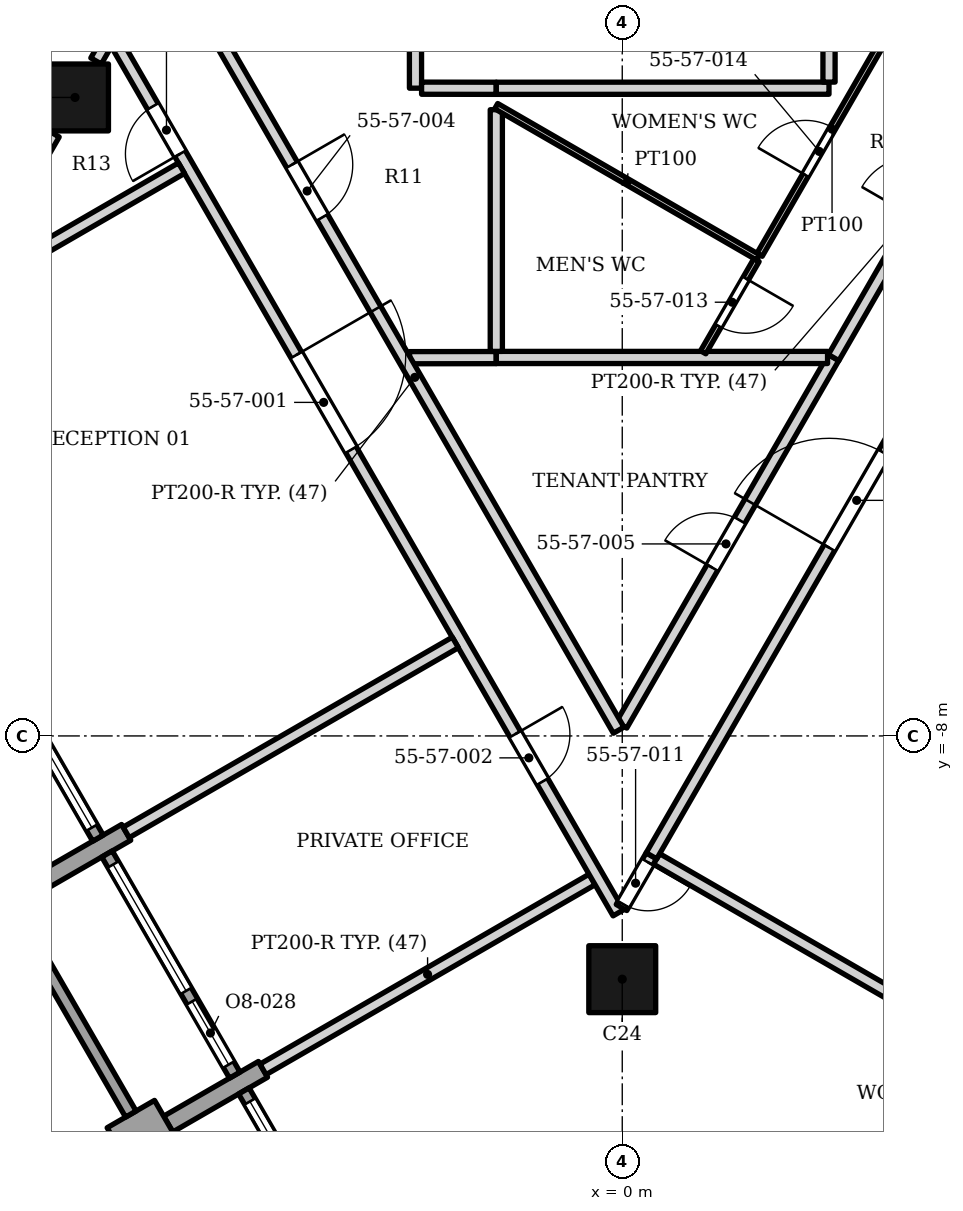
"""IFC4 building model, lengths in metres.
Left out: names, types, materials, properties, quantities, classifications, styles, units other than length and angle.
Written with IfcOpenShell. Run it as: python <this file> out.ifc"""

import sys

from ifc_helpers import new_model, si_unit, direction, frame, frame_2d, origin, origin_2d, place, context, subcontext, project, spatial, rectangle, extrude, element, fill, save


model = new_model("IFC4")
c1 = context("Model", 3, precision=1e-05, world=origin(), true_north=direction((0.0, 1.0)))
c2 = subcontext(c1, "Body", "Model", "MODEL_VIEW")
j1 = project(units=[si_unit("LENGTHUNIT", "METRE"), si_unit("PLANEANGLEUNIT", "RADIAN")], contexts=[c1])
p1 = place(None, origin())
s1 = spatial("IfcSite", under=j1, at=p1, CompositionType="ELEMENT")
p2 = place(p1, origin())
s2 = spatial("IfcBuilding", under=s1, at=p2, CompositionType="ELEMENT")
p3 = place(p2, frame((0.0, 0.0, 231.5)))
s3 = spatial("IfcBuildingStorey", under=s2, at=p3, CompositionType="ELEMENT", Elevation=231.5)
for number, where, z_axis, x_axis in (
    (1, (-9.0, 2.5, 0.0), (0.0, 0.0, 1.0), (1.0, 0.0, 0.0)),
    (2, (0.0, -12.0, 0.0), (0.0, 0.0, 1.0), (1.0, 0.0, 0.0)),
):
    element("IfcColumn", number, at=place(p3, frame(where, z_axis=z_axis, x_axis=x_axis)), inside=s3, PredefinedType="COLUMN", context=c2, shape_type="SweptSolid", body=[
        extrude(rectangle(XDim=1.1, YDim=1.1, at=origin_2d()), origin(), (0.0, 0.0, 1.0), 3.9),
    ])
p4 = place(p3, frame((-9.717, -10.486, 0.0), z_axis=(0.0, 0.0, 1.0), x_axis=(0.866047807691, 0.499961193289, 0.0)))
e3 = element("IfcWall", 3, at=p4, inside=s3, PredefinedType="SOLIDWALL", context=c2, shape_type="SweptSolid", body=[
    extrude(rectangle(XDim=1.8, YDim=0.3, at=frame_2d((0.9, 0.0))), origin(), (0.0, 0.0, 1.0), 2.884),
])
p5 = place(p3, frame((-7.467, -14.383, 0.0), z_axis=(0.0, 0.0, 1.0), x_axis=(-0.866013897511, -0.50001992892, 0.0)))
e4 = element("IfcWall", 4, at=p5, inside=s3, PredefinedType="SOLIDWALL", context=c2, shape_type="SweptSolid", body=[
    extrude(rectangle(XDim=0.9, YDim=0.9, at=frame_2d((0.45, 0.0))), origin(), (0.0, 0.0, 1.0), 3.0),
])
p6 = place(p3, frame((-7.467, -14.383, 0.0), z_axis=(0.0, 0.0, 1.0), x_axis=(0.865989075817, 0.500062916607, 0.0)))
e5 = element("IfcWall", 5, at=p6, inside=s3, PredefinedType="SOLIDWALL", context=c2, shape_type="SweptSolid", body=[
    extrude(rectangle(XDim=1.8, YDim=0.3, at=frame_2d((0.9, 0.0))), origin(), (0.0, 0.0, 1.0), 3.0),
])
p7 = place(p3, frame((-10.723, -6.044, 0.0), z_axis=(0.0, 0.0, 1.0), x_axis=(0.500027713859, -0.866009402589, 0.0)))
e6 = element("IfcWall", 6, at=p7, inside=s3, PredefinedType="ELEMENTEDWALL", context=c2, shape_type="SweptSolid", body=[
    extrude(rectangle(XDim=4.2, YDim=0.2, at=frame_2d((2.1, 0.0))), origin(), (0.0, 0.0, 1.0), 2.884),
])
p8 = place(p7, frame((0.2, 0.0, 0.45)))
e7 = element("IfcOpeningElement", 7, at=p8, cuts=e6, PredefinedType="OPENING", context=c2, shape_type="SweptSolid", body=[
    extrude(rectangle(XDim=3.8, YDim=2.25, at=frame_2d((1.9, 1.125))), frame((0.0, 0.11, 0.0), z_axis=(0.0, -1.0, 0.0), x_axis=(1.0, 0.0, 0.0)), (0.0, 0.0, 1.0), 0.22),
])
p9 = place(p3, frame((-9.882, -11.101, 0.0), z_axis=(0.0, 0.0, 1.0), x_axis=(0.500012057535, -0.866018442252, 0.0)))
e8 = element("IfcWall", 8, at=p9, inside=s3, PredefinedType="SOLIDWALL", context=c2, shape_type="SweptSolid", body=[
    extrude(rectangle(XDim=3.6, YDim=0.2, at=frame_2d((1.8, 0.0))), origin(), (0.0, 0.0, 1.0), 3.0),
])
p10 = place(p3, frame((-8.473, -9.941, 0.0), z_axis=(0.0, 0.0, 1.0), x_axis=(0.500027713859, -0.866009402589, 0.0)))
e9 = element("IfcWall", 9, at=p10, inside=s3, PredefinedType="ELEMENTEDWALL", context=c2, shape_type="SweptSolid", body=[
    extrude(rectangle(XDim=4.2, YDim=0.2, at=frame_2d((2.1, 0.0))), origin(), (0.0, 0.0, 1.0), 2.95),
])
p11 = place(p10, frame((0.2, 0.0, 0.45)))
e10 = element("IfcOpeningElement", 10, at=p11, cuts=e9, PredefinedType="OPENING", context=c2, shape_type="SweptSolid", body=[
    extrude(rectangle(XDim=2.4, YDim=2.25, at=frame_2d((1.2, 1.125))), frame((0.0, 0.11, 0.0), z_axis=(0.0, -1.0, 0.0), x_axis=(1.0, 0.0, 0.0)), (0.0, 0.0, 1.0), 0.22),
])
p12 = place(p10, frame((2.8, 0.0, 0.0)))
e11 = element("IfcOpeningElement", 11, at=p12, cuts=e9, PredefinedType="OPENING", context=c2, shape_type="SweptSolid", body=[
    extrude(rectangle(XDim=1.2, YDim=2.7, at=frame_2d((0.6, 1.35))), frame((0.0, 0.11, 0.0), z_axis=(0.0, -1.0, 0.0), x_axis=(1.0, 0.0, 0.0)), (0.0, 0.0, 1.0), 0.22),
])
p13 = place(p3, frame((-6.223, -13.838, 0.0), z_axis=(0.0, 0.0, 1.0), x_axis=(0.500002543286, -0.866023935413, 0.0)))
e12 = element("IfcWall", 12, at=p13, inside=s3, PredefinedType="ELEMENTEDWALL", context=c2, shape_type="SweptSolid", body=[
    extrude(rectangle(XDim=4.2, YDim=0.2, at=frame_2d((2.1, 0.0))), origin(), (0.0, 0.0, 1.0), 3.0),
])
p14 = place(p13, frame((0.2, 0.0, 0.45)))
e13 = element("IfcOpeningElement", 13, at=p14, cuts=e12, PredefinedType="OPENING", context=c2, shape_type="SweptSolid", body=[
    extrude(rectangle(XDim=3.8, YDim=2.25, at=frame_2d((1.9, 1.125))), frame((0.0, 0.11, 0.0), z_axis=(0.0, -1.0, 0.0), x_axis=(1.0, 0.0, 0.0)), (0.0, 0.0, 1.0), 0.22),
])
p15 = place(p3, frame((-5.908, -13.483, 0.0), z_axis=(0.0, 0.0, 1.0), x_axis=(0.866160870949, 0.499765290549, 0.0)))
e14 = element("IfcWall", 14, at=p15, inside=s3, PredefinedType="PARTITIONING", context=c2, shape_type="SweptSolid", body=[
    extrude(rectangle(XDim=6.25, YDim=0.2, at=frame_2d((3.125, 0.0))), origin(), (0.0, 0.0, 1.0), 2.742),
])
p16 = place(p3, frame((-8.403, 3.534, 0.0), z_axis=(0.0, 0.0, 1.0), x_axis=(0.499994899308, -0.86602834865, 0.0)))
e15 = element("IfcWall", 15, at=p16, inside=s3, PredefinedType="PARTITIONING", context=c2, shape_type="SweptSolid", body=[
    extrude(rectangle(XDim=16.677, YDim=0.2, at=frame_2d((8.339, 0.0))), origin(), (0.0, 0.0, 1.0), 2.742),
])
p17 = place(p16, frame((6.084, 0.0, 0.0)))
e16 = element("IfcOpeningElement", 16, at=p17, cuts=e15, PredefinedType="OPENING", context=c2, shape_type="SweptSolid", body=[
    extrude(rectangle(XDim=1.8, YDim=2.4, at=frame_2d((0.9, 1.2))), frame((0.0, 0.11, 0.0), z_axis=(0.0, -1.0, 0.0), x_axis=(1.0, 0.0, 0.0)), (0.0, 0.0, 1.0), 0.22),
])
p18 = place(p16, frame((13.285, 0.0, 0.0)))
e17 = element("IfcOpeningElement", 17, at=p18, cuts=e15, PredefinedType="OPENING", context=c2, shape_type="SweptSolid", body=[
    extrude(rectangle(XDim=0.9, YDim=2.1, at=frame_2d((0.45, 1.05))), frame((0.0, 0.11, 0.0), z_axis=(0.0, -1.0, 0.0), x_axis=(1.0, 0.0, 0.0)), (0.0, 0.0, 1.0), 0.22),
])
p19 = place(p16, frame((1.364, 0.0, 0.0)))
e18 = element("IfcOpeningElement", 18, at=p19, cuts=e15, PredefinedType="OPENING", context=c2, shape_type="SweptSolid", body=[
    extrude(rectangle(XDim=0.9, YDim=2.1, at=frame_2d((0.45, 1.05))), frame((0.0, 0.11, 0.0), z_axis=(0.0, -1.0, 0.0), x_axis=(1.0, 0.0, 0.0)), (0.0, 0.0, 1.0), 0.22),
])
p20 = place(p3, frame((-0.012, -10.822, 0.0), z_axis=(0.0, 0.0, 1.0), x_axis=(0.501271486133, 0.865290065348, 0.0)))
e19 = element("IfcWall", 19, at=p20, inside=s3, PredefinedType="PARTITIONING", context=c2, shape_type="SweptSolid", body=[
    extrude(rectangle(XDim=0.982, YDim=0.2, at=frame_2d((0.491, 0.0))), origin(), (0.0, 0.0, 1.0), 2.742),
])
p21 = place(p20, frame((0.062, 0.0, 0.0)))
e20 = element("IfcOpeningElement", 20, at=p21, cuts=e19, PredefinedType="OPENING", context=c2, shape_type="SweptSolid", body=[
    extrude(rectangle(XDim=0.8, YDim=2.1, at=frame_2d((0.4, 1.05))), frame((0.0, 0.11, 0.0), z_axis=(0.0, -1.0, 0.0), x_axis=(1.0, 0.0, 0.0)), (0.0, 0.0, 1.0), 0.22),
])
p22 = place(p3, frame((0.565, -10.022, 0.0), z_axis=(0.0, 0.0, 1.0), x_axis=(0.866127427728, -0.499823247696, 0.0)))
e21 = element("IfcWall", 21, at=p22, inside=s3, PredefinedType="PARTITIONING", context=c2, shape_type="SweptSolid", body=[
    extrude(rectangle(XDim=6.85, YDim=0.2, at=frame_2d((3.425, 0.0))), origin(), (0.0, 0.0, 1.0), 2.742),
])
p23 = place(p3, frame((-0.013, -7.821, 0.0), z_axis=(0.0, 0.0, 1.0), x_axis=(0.499774962009, 0.866155290551, 0.0)))
e22 = element("IfcWall", 22, at=p23, inside=s3, PredefinedType="PARTITIONING", context=c2, shape_type="SweptSolid", body=[
    extrude(rectangle(XDim=6.977, YDim=0.2, at=frame_2d((3.488, 0.0))), origin(), (0.0, 0.0, 1.0), 2.742),
])
p24 = place(p23, frame((2.989, 0.0, 0.0)))
e23 = element("IfcOpeningElement", 23, at=p24, cuts=e22, PredefinedType="OPENING", context=c2, shape_type="SweptSolid", body=[
    extrude(rectangle(XDim=0.9, YDim=2.1, at=frame_2d((0.45, 1.05))), frame((0.0, 0.11, 0.0), z_axis=(0.0, -1.0, 0.0), x_axis=(1.0, 0.0, 0.0)), (0.0, 0.0, 1.0), 0.22),
])
p25 = place(p3, frame((-8.158, -9.586, 0.0), z_axis=(0.0, 0.0, 1.0), x_axis=(0.866153717883, 0.499777687575, 0.0)))
e24 = element("IfcWall", 24, at=p25, inside=s3, PredefinedType="PARTITIONING", context=c2, shape_type="SweptSolid", body=[
    extrude(rectangle(XDim=6.25, YDim=0.2, at=frame_2d((3.125, 0.0))), origin(), (0.0, 0.0, 1.0), 2.742),
])
p26 = place(p3, frame((-12.659, -1.791, 0.0), z_axis=(0.0, 0.0, 1.0), x_axis=(0.865661558062, 0.500629670408, 0.0)))
e25 = element("IfcWall", 25, at=p26, inside=s3, PredefinedType="PARTITIONING", context=c2, shape_type="SweptSolid", body=[
    extrude(rectangle(XDim=6.25, YDim=0.2, at=frame_2d((3.125, 0.0))), origin(), (0.0, 0.0, 1.0), 2.884),
])
p27 = place(p3, frame((-3.499, -1.78, 0.0), z_axis=(0.0, 0.0, 1.0), x_axis=(0.999999471866, 0.001027748686, 0.0)))
e26 = element("IfcWall", 26, at=p27, inside=s3, PredefinedType="PARTITIONING", context=c2, shape_type="SweptSolid", body=[
    extrude(rectangle(XDim=1.425, YDim=0.2, at=frame_2d((0.713, 0.0))), origin(), (0.0, 0.0, 1.0), 3.73),
])
p28 = place(p3, frame((-2.071, -1.776, 0.0), z_axis=(0.0, 0.0, 1.0), x_axis=(1.0, 0.0, 0.0)))
e27 = element("IfcWall", 27, at=p28, inside=s3, PredefinedType="PARTITIONING", context=c2, shape_type="SweptSolid", body=[
    extrude(rectangle(XDim=5.448, YDim=0.2, at=frame_2d((2.724, 0.0))), origin(), (0.0, 0.0, 1.0), 2.742),
])
p29 = place(p3, frame((3.476, -1.778, 0.0), z_axis=(0.0, 0.0, 1.0), x_axis=(0.500016482634, 0.866015887322, 0.0)))
e28 = element("IfcWall", 28, at=p29, inside=s3, PredefinedType="PARTITIONING", context=c2, shape_type="SweptSolid", body=[
    extrude(rectangle(XDim=6.325, YDim=0.2, at=frame_2d((3.163, 0.0))), origin(), (0.0, 0.0, 1.0), 2.742),
])
p30 = place(p29, frame((2.663, 0.0, 0.0)))
e29 = element("IfcOpeningElement", 29, at=p30, cuts=e28, PredefinedType="OPENING", context=c2, shape_type="SweptSolid", body=[
    extrude(rectangle(XDim=1.0, YDim=2.1, at=frame_2d((0.5, 1.05))), frame((0.0, 0.11, 0.0), z_axis=(0.0, -1.0, 0.0), x_axis=(1.0, 0.0, 0.0)), (0.0, 0.0, 1.0), 0.22),
])
p31 = place(p3, frame((1.331, -1.691, 0.0), z_axis=(0.0, 0.0, 1.0), x_axis=(0.500723196883, 0.865607463059, 0.0)))
e30 = element("IfcWall", 30, at=p31, inside=s3, PredefinedType="PARTITIONING", context=c2, shape_type="SweptSolid", body=[
    extrude(rectangle(XDim=1.752, YDim=0.1, at=frame_2d((0.876, 0.0))), origin(), (0.0, 0.0, 1.0), 2.742),
])
p32 = place(p31, frame((0.502, 0.0, 0.0)))
e31 = element("IfcOpeningElement", 31, at=p32, cuts=e30, PredefinedType="OPENING", context=c2, shape_type="SweptSolid", body=[
    extrude(rectangle(XDim=0.9, YDim=2.1, at=frame_2d((0.45, 1.05))), frame((0.0, 0.06, 0.0), z_axis=(0.0, -1.0, 0.0), x_axis=(1.0, 0.0, 0.0)), (0.0, 0.0, 1.0), 0.12),
])
p33 = place(p3, frame((-10.787, -0.594, 0.0), z_axis=(0.0, 0.0, 1.0), x_axis=(0.500287485194, 0.865859360496, 0.0)))
e32 = element("IfcWall", 32, at=p33, inside=s3, PredefinedType="PARTITIONING", context=c2, shape_type="SweptSolid", body=[
    extrude(rectangle(XDim=2.88, YDim=0.2, at=frame_2d((1.44, 0.0))), origin(), (0.0, 0.0, 1.0), 3.73),
])
p34 = place(p3, frame((2.258, -0.087, 0.0), z_axis=(0.0, 0.0, 1.0), x_axis=(0.499684056676, 0.866207736922, 0.0)))
e33 = element("IfcWall", 33, at=p34, inside=s3, PredefinedType="PARTITIONING", context=c2, shape_type="SweptSolid", body=[
    extrude(rectangle(XDim=4.771, YDim=0.1, at=frame_2d((2.385, 0.0))), origin(), (0.0, 0.0, 1.0), 2.742),
])
p35 = place(p34, frame((1.513, 0.0, 0.0)))
e34 = element("IfcOpeningElement", 34, at=p35, cuts=e33, PredefinedType="OPENING", context=c2, shape_type="SweptSolid", body=[
    extrude(rectangle(XDim=0.9, YDim=2.1, at=frame_2d((0.45, 1.05))), frame((0.0, 0.06, 0.0), z_axis=(0.0, -1.0, 0.0), x_axis=(1.0, 0.0, 0.0)), (0.0, 0.0, 1.0), 0.12),
])
p36 = place(p3, frame((-2.071, -1.676, 0.0), z_axis=(0.0, 0.0, 1.0), x_axis=(0.0, 1.0, 0.0)))
e35 = element("IfcWall", 35, at=p36, inside=s3, PredefinedType="PARTITIONING", context=c2, shape_type="SweptSolid", body=[
    extrude(rectangle(XDim=3.975, YDim=0.2, at=frame_2d((1.987, 0.0))), origin(), (0.0, 0.0, 1.0), 2.742),
])
p37 = place(p3, frame((-2.073, 2.357, 0.0), z_axis=(0.0, 0.0, 1.0), x_axis=(0.865852787501, -0.500298861059, 0.0)))
e36 = element("IfcWall", 36, at=p37, inside=s3, PredefinedType="PARTITIONING", context=c2, shape_type="SweptSolid", body=[
    extrude(rectangle(XDim=4.974, YDim=0.1, at=frame_2d((2.487, 0.0))), origin(), (0.0, 0.0, 1.0), 2.742),
])
p38 = place(p3, frame((-3.402, 4.351, 0.0), z_axis=(0.0, 0.0, 1.0), x_axis=(0.001150085496, -0.999999338651, 0.0)))
e37 = element("IfcWall", 37, at=p38, inside=s3, PredefinedType="PARTITIONING", context=c2, shape_type="SweptSolid", body=[
    extrude(rectangle(XDim=1.698, YDim=0.2, at=frame_2d((0.849, 0.0))), origin(), (0.0, 0.0, 1.0), 3.73),
])
p39 = place(p3, frame((-3.3, 2.652, 0.0), z_axis=(0.0, 0.0, 1.0), x_axis=(0.999999030114, -0.001392756309, 0.0)))
e38 = element("IfcWall", 38, at=p39, inside=s3, PredefinedType="PARTITIONING", context=c2, shape_type="SweptSolid", body=[
    extrude(rectangle(XDim=1.227, YDim=0.2, at=frame_2d((0.614, 0.0))), origin(), (0.0, 0.0, 1.0), 3.73),
])
p40 = place(p3, frame((-2.071, 2.651, 0.0), z_axis=(0.0, 0.0, 1.0), x_axis=(0.99999995122, 0.0003123466, 0.0)))
e39 = element("IfcWall", 39, at=p40, inside=s3, PredefinedType="PARTITIONING", context=c2, shape_type="SweptSolid", body=[
    extrude(rectangle(XDim=5.471, YDim=0.2, at=frame_2d((2.736, 0.0))), origin(), (0.0, 0.0, 1.0), 3.73),
])
p41 = place(p3, frame((-8.654, 3.1, 0.0), z_axis=(0.0, 0.0, 1.0), x_axis=(0.497766425922, 0.86731112366, 0.0)))
e40 = element("IfcWall", 40, at=p41, inside=s3, PredefinedType="PARTITIONING", context=c2, shape_type="SweptSolid", body=[
    extrude(rectangle(XDim=0.404, YDim=0.2, at=frame_2d((0.202, 0.0))), origin(), (0.0, 0.0, 1.0), 3.73),
])
p42 = place(p3, frame((-6.764, 3.7, 0.0), z_axis=(0.0, 0.0, 1.0), x_axis=(0.500260603275, -0.865874892124, 0.0)))
e41 = element("IfcWall", 41, at=p42, inside=s3, PredefinedType="PARTITIONING", context=c2, shape_type="SweptSolid", body=[
    extrude(rectangle(XDim=13.403, YDim=0.2, at=frame_2d((6.702, 0.0))), origin(), (0.0, 0.0, 1.0), 2.742),
])
p43 = place(p42, frame((2.663, 0.0, 0.0)))
e42 = element("IfcOpeningElement", 42, at=p43, cuts=e41, PredefinedType="OPENING", context=c2, shape_type="SweptSolid", body=[
    extrude(rectangle(XDim=1.0, YDim=2.1, at=frame_2d((0.5, 1.05))), frame((0.0, 0.11, 0.0), z_axis=(0.0, -1.0, 0.0), x_axis=(1.0, 0.0, 0.0)), (0.0, 0.0, 1.0), 0.22),
])
p44 = place(p3, frame((0.48, -9.972, 0.0), z_axis=(0.0, 0.0, 1.0), x_axis=(0.499998248741, 0.866026414872, 0.0)))
e43 = element("IfcWall", 43, at=p44, inside=s3, PredefinedType="PARTITIONING", context=c2, shape_type="SweptSolid", body=[
    extrude(rectangle(XDim=15.785, YDim=0.2, at=frame_2d((7.893, 0.0))), origin(), (0.0, 0.0, 1.0), 2.742),
])
p45 = place(p44, frame((5.85, 0.0, 0.0)))
e44 = element("IfcOpeningElement", 44, at=p45, cuts=e43, PredefinedType="OPENING", context=c2, shape_type="SweptSolid", body=[
    extrude(rectangle(XDim=1.8, YDim=2.4, at=frame_2d((0.9, 1.2))), frame((0.0, 0.11, 0.0), z_axis=(0.0, -1.0, 0.0), x_axis=(1.0, 0.0, 0.0)), (0.0, 0.0, 1.0), 0.22),
])
p46 = place(p3, frame((3.4, 2.752, 0.0), z_axis=(0.0, 0.0, 1.0), x_axis=(0.001222119466, 0.999999253212, 0.0)))
e45 = element("IfcWall", 45, at=p46, inside=s3, PredefinedType="PARTITIONING", context=c2, shape_type="SweptSolid", body=[
    extrude(rectangle(XDim=1.598, YDim=0.2, at=frame_2d((0.799, 0.0))), origin(), (0.0, 0.0, 1.0), 3.73),
])
p47 = place(p8, origin())
e46 = element("IfcWindow", 46, at=p47, inside=s3, PartitioningType="SINGLE_PANEL", PredefinedType="WINDOW", context=c2, shape_type="SweptSolid", body=[
    extrude(rectangle(XDim=3.8, YDim=2.25, at=frame_2d((1.9, 1.125))), frame((0.0, 0.03, 0.0), z_axis=(0.0, -1.0, 0.0), x_axis=(1.0, 0.0, 0.0)), (0.0, 0.0, 1.0), 0.06),
])
fill(e7, e46)
p48 = place(p11, origin())
e47 = element("IfcWindow", 47, at=p48, inside=s3, PartitioningType="SINGLE_PANEL", PredefinedType="WINDOW", context=c2, shape_type="SweptSolid", body=[
    extrude(rectangle(XDim=2.4, YDim=2.25, at=frame_2d((1.2, 1.125))), frame((0.0, 0.03, 0.0), z_axis=(0.0, -1.0, 0.0), x_axis=(1.0, 0.0, 0.0)), (0.0, 0.0, 1.0), 0.06),
])
fill(e10, e47)
p49 = place(p12, origin())
e48 = element("IfcDoor", 48, at=p49, inside=s3, OperationType="SINGLE_SWING_LEFT", PredefinedType="DOOR", context=c2, shape_type="SweptSolid", body=[
    extrude(rectangle(XDim=1.2, YDim=2.7, at=frame_2d((0.6, 1.35))), frame((0.0, 0.025, 0.0), z_axis=(0.0, -1.0, 0.0), x_axis=(1.0, 0.0, 0.0)), (0.0, 0.0, 1.0), 0.05),
])
fill(e11, e48)
p50 = place(p14, origin())
e49 = element("IfcWindow", 49, at=p50, inside=s3, PartitioningType="SINGLE_PANEL", PredefinedType="WINDOW", context=c2, shape_type="SweptSolid", body=[
    extrude(rectangle(XDim=3.8, YDim=2.25, at=frame_2d((1.9, 1.125))), frame((0.0, 0.03, 0.0), z_axis=(0.0, -1.0, 0.0), x_axis=(1.0, 0.0, 0.0)), (0.0, 0.0, 1.0), 0.06),
])
fill(e13, e49)
p51 = place(p17, origin())
e50 = element("IfcDoor", 50, at=p51, inside=s3, OperationType="DOUBLE_DOOR_SINGLE_SWING", PredefinedType="DOOR", context=c2, shape_type="SweptSolid", body=[
    extrude(rectangle(XDim=1.8, YDim=2.4, at=frame_2d((0.9, 1.2))), frame((0.0, 0.025, 0.0), z_axis=(0.0, -1.0, 0.0), x_axis=(1.0, 0.0, 0.0)), (0.0, 0.0, 1.0), 0.05),
])
fill(e16, e50)
p52 = place(p18, origin())
e51 = element("IfcDoor", 51, at=p52, inside=s3, OperationType="SINGLE_SWING_LEFT", PredefinedType="DOOR", context=c2, shape_type="SweptSolid", body=[
    extrude(rectangle(XDim=0.9, YDim=2.1, at=frame_2d((0.45, 1.05))), frame((0.0, 0.025, 0.0), z_axis=(0.0, -1.0, 0.0), x_axis=(1.0, 0.0, 0.0)), (0.0, 0.0, 1.0), 0.05),
])
fill(e17, e51)
p53 = place(p45, origin())
e52 = element("IfcDoor", 52, at=p53, inside=s3, OperationType="DOUBLE_DOOR_SINGLE_SWING", PredefinedType="DOOR", context=c2, shape_type="SweptSolid", body=[
    extrude(rectangle(XDim=1.8, YDim=2.4, at=frame_2d((0.9, 1.2))), frame((0.0, 0.025, 0.0), z_axis=(0.0, -1.0, 0.0), x_axis=(1.0, 0.0, 0.0)), (0.0, 0.0, 1.0), 0.05),
])
fill(e44, e52)
p54 = place(p43, origin())
e53 = element("IfcDoor", 53, at=p54, inside=s3, OperationType="SINGLE_SWING_LEFT", PredefinedType="DOOR", context=c2, shape_type="SweptSolid", body=[
    extrude(rectangle(XDim=1.0, YDim=2.1, at=frame_2d((0.5, 1.05))), frame((0.0, 0.025, 0.0), z_axis=(0.0, -1.0, 0.0), x_axis=(1.0, 0.0, 0.0)), (0.0, 0.0, 1.0), 0.05),
])
fill(e42, e53)
p55 = place(p24, origin())
e54 = element("IfcDoor", 54, at=p55, inside=s3, OperationType="SINGLE_SWING_LEFT", PredefinedType="DOOR", context=c2, shape_type="SweptSolid", body=[
    extrude(rectangle(XDim=0.9, YDim=2.1, at=frame_2d((0.45, 1.05))), frame((0.0, 0.025, 0.0), z_axis=(0.0, -1.0, 0.0), x_axis=(1.0, 0.0, 0.0)), (0.0, 0.0, 1.0), 0.05),
])
fill(e23, e54)
p56 = place(p19, origin())
e55 = element("IfcDoor", 55, at=p56, inside=s3, OperationType="SINGLE_SWING_RIGHT", PredefinedType="DOOR", context=c2, shape_type="SweptSolid", body=[
    extrude(rectangle(XDim=0.9, YDim=2.1, at=frame_2d((0.45, 1.05))), frame((0.0, 0.025, 0.0), z_axis=(0.0, -1.0, 0.0), x_axis=(1.0, 0.0, 0.0)), (0.0, 0.0, 1.0), 0.05),
])
fill(e18, e55)
p57 = place(p21, origin())
e56 = element("IfcDoor", 56, at=p57, inside=s3, OperationType="SINGLE_SWING_RIGHT", PredefinedType="DOOR", context=c2, shape_type="SweptSolid", body=[
    extrude(rectangle(XDim=0.8, YDim=2.1, at=frame_2d((0.4, 1.05))), frame((0.0, 0.025, 0.0), z_axis=(0.0, -1.0, 0.0), x_axis=(1.0, 0.0, 0.0)), (0.0, 0.0, 1.0), 0.05),
])
fill(e20, e56)
p58 = place(p32, origin())
e57 = element("IfcDoor", 57, at=p58, inside=s3, OperationType="SINGLE_SWING_RIGHT", PredefinedType="DOOR", context=c2, shape_type="SweptSolid", body=[
    extrude(rectangle(XDim=0.9, YDim=2.1, at=frame_2d((0.45, 1.05))), frame((0.0, 0.025, 0.0), z_axis=(0.0, -1.0, 0.0), x_axis=(1.0, 0.0, 0.0)), (0.0, 0.0, 1.0), 0.05),
])
fill(e31, e57)
p59 = place(p35, origin())
e58 = element("IfcDoor", 58, at=p59, inside=s3, OperationType="SINGLE_SWING_LEFT", PredefinedType="DOOR", context=c2, shape_type="SweptSolid", body=[
    extrude(rectangle(XDim=0.9, YDim=2.1, at=frame_2d((0.45, 1.05))), frame((0.0, 0.025, 0.0), z_axis=(0.0, -1.0, 0.0), x_axis=(1.0, 0.0, 0.0)), (0.0, 0.0, 1.0), 0.05),
])
fill(e34, e58)
save(model, sys.argv[1])
